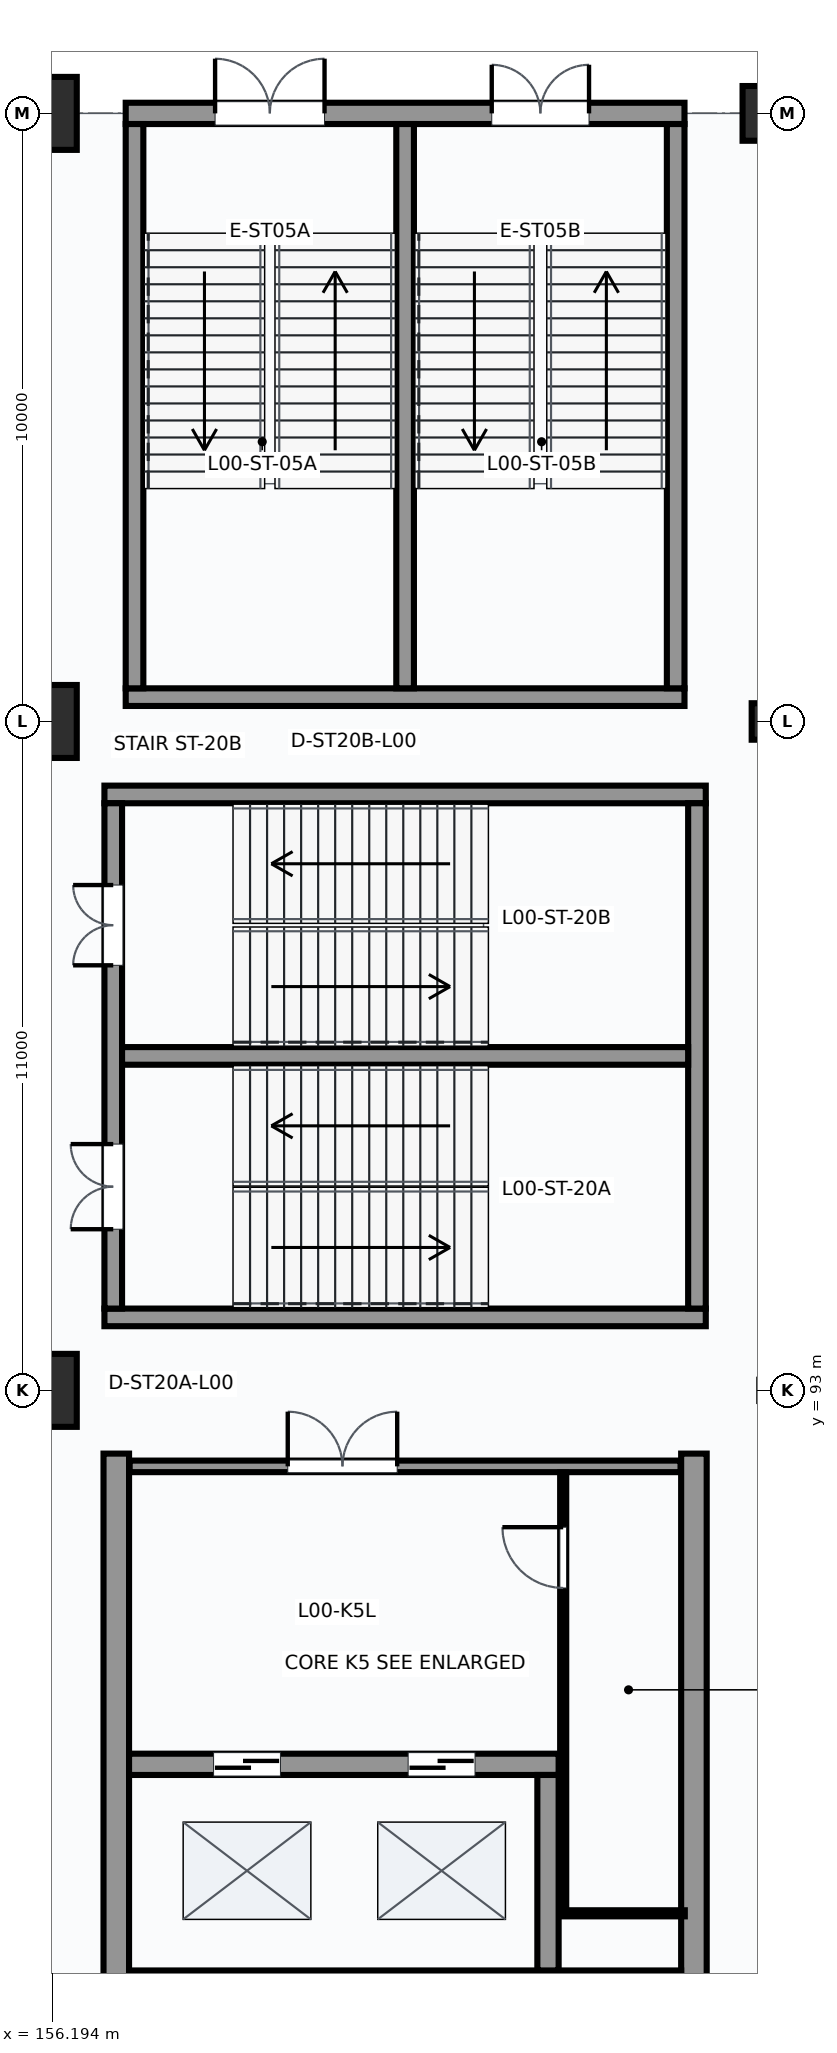
"""IFC4 building model, lengths in metres.
Left out: names, types, materials, properties, quantities, classifications, styles, units other than length and angle.
Written with IfcOpenShell. Run it as: python <this file> out.ifc"""

import sys

from ifc_helpers import new_model, si_unit, direction, frame, frame_2d, origin, origin_2d, place, context, subcontext, project, spatial, rectangle, circle, extrude, element, fill, save


model = new_model("IFC4")
c1 = context("Model", 3, precision=1e-05, world=origin(), true_north=direction((0.0, 1.0)))
c2 = subcontext(c1, "Body", "Model", "MODEL_VIEW")
j1 = project(units=[si_unit("LENGTHUNIT", "METRE"), si_unit("PLANEANGLEUNIT", "RADIAN")], contexts=[c1])
p1 = place(None, origin())
s1 = spatial("IfcSite", under=j1, at=p1, CompositionType="ELEMENT")
p2 = place(p1, origin())
s2 = spatial("IfcBuilding", under=s1, at=p2, CompositionType="ELEMENT")
p3 = place(p2, origin())
s3 = spatial("IfcBuildingStorey", under=s2, at=p3, CompositionType="ELEMENT", Elevation=0.0)
for number, where, z_axis, x_axis in (
    (1, (156.0, 93.0, 0.0), (0.0, 0.0, 1.0), (1.0, 0.0, 0.0)),
    (2, (156.0, 104.0, 0.0), (0.0, 0.0, 1.0), (1.0, 0.0, 0.0)),
    (3, (156.0, 114.0, 0.0), (0.0, 0.0, 1.0), (1.0, 0.0, 0.0)),
):
    element("IfcColumn", number, at=place(p3, frame(where, z_axis=z_axis, x_axis=x_axis)), inside=s3, PredefinedType="COLUMN", context=c2, shape_type="SweptSolid", body=[
        extrude(rectangle(XDim=1.2, YDim=1.2, at=origin_2d()), origin(), (0.0, 0.0, 1.0), 5.4),
    ])
p4 = place(p3, frame((168.0, 104.0, 0.0), z_axis=(0.0, 0.0, 1.0), x_axis=(1.0, 0.0, 0.0)))
e4 = element("IfcColumn", 4, at=p4, inside=s3, PredefinedType="COLUMN", context=c2, shape_type="SweptSolid", body=[
    extrude(rectangle(XDim=0.6, YDim=0.6, at=origin_2d()), origin(), (0.0, 0.0, 1.0), 5.4),
])
p5 = place(p3, frame((168.0, 114.0, 0.0), z_axis=(0.0, 0.0, 1.0), x_axis=(1.0, 0.0, 0.0)))
e5 = element("IfcColumn", 5, at=p5, inside=s3, PredefinedType="COLUMN", context=c2, shape_type="SweptSolid", body=[
    extrude(circle(Radius=0.45, at=origin_2d()), origin(), (0.0, 0.0, 1.0), 5.4),
])
p6 = place(p3, frame((157.405, 104.4, 0.0), z_axis=(0.0, 0.0, 1.0), x_axis=(1.0, 0.0, 0.0)))
e6 = element("IfcWall", 6, at=p6, inside=s3, PredefinedType="SHEAR", context=c2, shape_type="SweptSolid", body=[
    extrude(rectangle(XDim=9.19, YDim=0.29, at=frame_2d((4.595, 0.0))), origin(), (0.0, 0.0, 1.0), 5.4),
])
p7 = place(p3, frame((157.405, 114.0, 0.0), z_axis=(0.0, 0.0, 1.0), x_axis=(1.0, 0.0, 0.0)))
e7 = element("IfcWall", 7, at=p7, inside=s3, PredefinedType="SHEAR", context=c2, shape_type="SweptSolid", body=[
    extrude(rectangle(XDim=9.19, YDim=0.35, at=frame_2d((4.595, 0.0))), origin(), (0.0, 0.0, 1.0), 4.347),
])
p8 = place(p7, frame((1.47, 0.0, 0.0)))
e8 = element("IfcOpeningElement", 8, at=p8, cuts=e7, PredefinedType="OPENING", context=c2, shape_type="SweptSolid", body=[
    extrude(rectangle(XDim=1.8, YDim=2.2, at=frame_2d((0.9, 1.1))), frame((0.0, 0.185, 0.0), z_axis=(0.0, -1.0, 0.0), x_axis=(1.0, 0.0, 0.0)), (0.0, 0.0, 1.0), 0.37),
])
p9 = place(p7, frame((6.02, 0.0, 0.0)))
e9 = element("IfcOpeningElement", 9, at=p9, cuts=e7, PredefinedType="OPENING", context=c2, shape_type="SweptSolid", body=[
    extrude(rectangle(XDim=1.6, YDim=2.2, at=frame_2d((0.8, 1.1))), frame((0.0, 0.185, 0.0), z_axis=(0.0, -1.0, 0.0), x_axis=(1.0, 0.0, 0.0)), (0.0, 0.0, 1.0), 0.37),
])
for number, where, z_axis, x_axis in (
    (10, (157.55, 104.545, 0.0), (0.0, 0.0, 1.0), (0.0, 1.0, 0.0)),
    (11, (166.45, 104.545, 0.0), (0.0, 0.0, 1.0), (0.0, 1.0, 0.0)),
    (12, (162.0, 104.545, 0.0), (0.0, 0.0, 1.0), (0.0, 1.0, 0.0)),
):
    element("IfcWall", number, at=place(p3, frame(where, z_axis=z_axis, x_axis=x_axis)), inside=s3, PredefinedType="SHEAR", context=c2, shape_type="SweptSolid", body=[
        extrude(rectangle(XDim=9.28, YDim=0.29, at=frame_2d((4.64, 0.0))), origin(), (0.0, 0.0, 1.0), 5.4),
    ])
for number, where, z_axis, x_axis in (
    (13, (157.055, 94.2, 0.0), (0.0, 0.0, 1.0), (1.0, 0.0, 0.0)),
    (14, (157.055, 102.8, 0.0), (0.0, 0.0, 1.0), (1.0, 0.0, 0.0)),
):
    element("IfcWall", number, at=place(p3, frame(where, z_axis=z_axis, x_axis=x_axis)), inside=s3, PredefinedType="SHEAR", context=c2, shape_type="SweptSolid", body=[
        extrude(rectangle(XDim=9.89, YDim=0.29, at=frame_2d((4.945, 0.0))), origin(), (0.0, 0.0, 1.0), 5.4),
    ])
p10 = place(p3, frame((157.2, 94.345, 0.0), z_axis=(0.0, 0.0, 1.0), x_axis=(0.0, 1.0, 0.0)))
e15 = element("IfcWall", 15, at=p10, inside=s3, PredefinedType="SHEAR", context=c2, shape_type="SweptSolid", body=[
    extrude(rectangle(XDim=8.31, YDim=0.29, at=frame_2d((4.155, 0.0))), origin(), (0.0, 0.0, 1.0), 5.4),
])
p11 = place(p10, frame((1.305, 0.0, 0.0)))
e16 = element("IfcOpeningElement", 16, at=p11, cuts=e15, PredefinedType="OPENING", context=c2, shape_type="SweptSolid", body=[
    extrude(rectangle(XDim=1.4, YDim=2.2, at=frame_2d((0.7, 1.1))), frame((0.0, 0.155, 0.0), z_axis=(0.0, -1.0, 0.0), x_axis=(1.0, 0.0, 0.0)), (0.0, 0.0, 1.0), 0.31),
])
p12 = place(p10, frame((5.645, 0.0, 0.0)))
e17 = element("IfcOpeningElement", 17, at=p12, cuts=e15, PredefinedType="OPENING", context=c2, shape_type="SweptSolid", body=[
    extrude(rectangle(XDim=1.32, YDim=2.2, at=frame_2d((0.66, 1.1))), frame((0.0, 0.155, 0.0), z_axis=(0.0, -1.0, 0.0), x_axis=(1.0, 0.0, 0.0)), (0.0, 0.0, 1.0), 0.31),
])
p13 = place(p3, frame((166.8, 94.345, 0.0), z_axis=(0.0, 0.0, 1.0), x_axis=(0.0, 1.0, 0.0)))
e18 = element("IfcWall", 18, at=p13, inside=s3, PredefinedType="SHEAR", context=c2, shape_type="SweptSolid", body=[
    extrude(rectangle(XDim=8.31, YDim=0.29, at=frame_2d((4.155, 0.0))), origin(), (0.0, 0.0, 1.0), 5.4),
])
p14 = place(p3, frame((157.345, 98.5, 0.0), z_axis=(0.0, 0.0, 1.0), x_axis=(1.0, 0.0, 0.0)))
e19 = element("IfcWall", 19, at=p14, inside=s3, PredefinedType="SHEAR", context=c2, shape_type="SweptSolid", body=[
    extrude(rectangle(XDim=9.31, YDim=0.29, at=frame_2d((4.655, 0.0))), origin(), (0.0, 0.0, 1.0), 5.4),
])
for number, where, z_axis, x_axis in (
    (20, (157.25, 83.04, 0.0), (0.0, 0.0, 1.0), (0.0, 1.0, 0.0)),
    (21, (166.75, 83.04, 0.0), (0.0, 0.0, 1.0), (0.0, 1.0, 0.0)),
):
    element("IfcWall", number, at=place(p3, frame(where, z_axis=z_axis, x_axis=x_axis)), inside=s3, PredefinedType="SHEAR", context=c2, shape_type="SweptSolid", body=[
        extrude(rectangle(XDim=8.92, YDim=0.42, at=frame_2d((4.46, 0.0))), origin(), (0.0, 0.0, 1.0), 5.4),
    ])
p15 = place(p3, frame((157.46, 83.25, 0.0), z_axis=(0.0, 0.0, 1.0), x_axis=(1.0, 0.0, 0.0)))
e22 = element("IfcWall", 22, at=p15, inside=s3, PredefinedType="SHEAR", context=c2, shape_type="SweptSolid", body=[
    extrude(rectangle(XDim=9.08, YDim=0.42, at=frame_2d((4.54, 0.0))), origin(), (0.0, 0.0, 1.0), 5.4),
])
p16 = place(p3, frame((157.46, 86.85, 0.0), z_axis=(0.0, 0.0, 1.0), x_axis=(1.0, 0.0, 0.0)))
e23 = element("IfcWall", 23, at=p16, inside=s3, PredefinedType="SHEAR", context=c2, shape_type="SweptSolid", body=[
    extrude(rectangle(XDim=7.065, YDim=0.35, at=frame_2d((3.532, 0.0))), origin(), (0.0, 0.0, 1.0), 5.4),
])
p17 = place(p16, frame((1.39, 0.0, 0.0)))
e24 = element("IfcOpeningElement", 24, at=p17, cuts=e23, PredefinedType="OPENING", context=c2, shape_type="SweptSolid", body=[
    extrude(rectangle(XDim=1.1, YDim=2.2, at=frame_2d((0.55, 1.1))), frame((0.0, 0.185, 0.0), z_axis=(0.0, -1.0, 0.0), x_axis=(1.0, 0.0, 0.0)), (0.0, 0.0, 1.0), 0.37),
])
p18 = place(p16, frame((4.59, 0.0, 0.0)))
e25 = element("IfcOpeningElement", 25, at=p18, cuts=e23, PredefinedType="OPENING", context=c2, shape_type="SweptSolid", body=[
    extrude(rectangle(XDim=1.1, YDim=2.2, at=frame_2d((0.55, 1.1))), frame((0.0, 0.185, 0.0), z_axis=(0.0, -1.0, 0.0), x_axis=(1.0, 0.0, 0.0)), (0.0, 0.0, 1.0), 0.37),
])
p19 = place(p3, frame((164.35, 83.46, 0.0), z_axis=(0.0, 0.0, 1.0), x_axis=(0.0, 1.0, 0.0)))
e26 = element("IfcWall", 26, at=p19, inside=s3, PredefinedType="SHEAR", context=c2, shape_type="SweptSolid", body=[
    extrude(rectangle(XDim=3.215, YDim=0.35, at=frame_2d((1.607, 0.0))), origin(), (0.0, 0.0, 1.0), 5.4),
])
p20 = place(p3, frame((157.47, 91.75, 0.0), z_axis=(0.0, 0.0, 1.0), x_axis=(1.0, 0.0, 0.0)))
e27 = element("IfcWall", 27, at=p20, inside=s3, PredefinedType="PARTITIONING", context=c2, shape_type="SweptSolid", body=[
    extrude(rectangle(XDim=9.06, YDim=0.19, at=frame_2d((4.53, 0.0))), origin(), (0.0, 0.0, 1.0), 5.06),
])
p21 = place(p20, frame((2.6, 0.0, 0.0)))
e28 = element("IfcOpeningElement", 28, at=p21, cuts=e27, PredefinedType="OPENING", context=c2, shape_type="SweptSolid", body=[
    extrude(rectangle(XDim=1.8, YDim=2.3, at=frame_2d((0.9, 1.15))), frame((0.0, 0.105, 0.0), z_axis=(0.0, -1.0, 0.0), x_axis=(1.0, 0.0, 0.0)), (0.0, 0.0, 1.0), 0.21),
])
p22 = place(p3, frame((164.6, 84.4, 0.0), z_axis=(0.0, 0.0, 1.0), x_axis=(0.0, 1.0, 0.0)))
e29 = element("IfcWall", 29, at=p22, inside=s3, PredefinedType="PARTITIONING", context=c2, shape_type="SweptSolid", body=[
    extrude(rectangle(XDim=7.25, YDim=0.1, at=frame_2d((3.625, 0.0))), origin(), (0.0, 0.0, 1.0), 5.06),
])
p23 = place(p22, frame((5.35, 0.0, 0.0)))
e30 = element("IfcOpeningElement", 30, at=p23, cuts=e29, PredefinedType="OPENING", context=c2, shape_type="SweptSolid", body=[
    extrude(rectangle(XDim=1.0, YDim=2.1, at=frame_2d((0.5, 1.05))), frame((0.0, 0.06, 0.0), z_axis=(0.0, -1.0, 0.0), x_axis=(1.0, 0.0, 0.0)), (0.0, 0.0, 1.0), 0.12),
])
p24 = place(p3, frame((164.6, 84.4, 0.0), z_axis=(0.0, 0.0, 1.0), x_axis=(1.0, 0.0, 0.0)))
e31 = element("IfcWall", 31, at=p24, inside=s3, PredefinedType="PARTITIONING", context=c2, shape_type="SweptSolid", body=[
    extrude(rectangle(XDim=2.0, YDim=0.1, at=frame_2d((1.0, 0.0))), origin(), (0.0, 0.0, 1.0), 5.06),
])
p25 = place(p8, origin())
e32 = element("IfcDoor", 32, at=p25, inside=s3, OperationType="DOUBLE_DOOR_SINGLE_SWING", PredefinedType="DOOR", context=c2, shape_type="SweptSolid", body=[
    extrude(rectangle(XDim=1.8, YDim=2.2, at=frame_2d((0.9, 1.1))), frame((0.0, 0.025, 0.0), z_axis=(0.0, -1.0, 0.0), x_axis=(1.0, 0.0, 0.0)), (0.0, 0.0, 1.0), 0.05),
])
fill(e8, e32)
p26 = place(p9, origin())
e33 = element("IfcDoor", 33, at=p26, inside=s3, OperationType="DOUBLE_DOOR_SINGLE_SWING", PredefinedType="DOOR", context=c2, shape_type="SweptSolid", body=[
    extrude(rectangle(XDim=1.6, YDim=2.2, at=frame_2d((0.8, 1.1))), frame((0.0, 0.025, 0.0), z_axis=(0.0, -1.0, 0.0), x_axis=(1.0, 0.0, 0.0)), (0.0, 0.0, 1.0), 0.05),
])
fill(e9, e33)
p27 = place(p11, origin())
e34 = element("IfcDoor", 34, at=p27, inside=s3, OperationType="DOUBLE_DOOR_SINGLE_SWING", PredefinedType="DOOR", context=c2, shape_type="SweptSolid", body=[
    extrude(rectangle(XDim=1.4, YDim=2.2, at=frame_2d((0.7, 1.1))), frame((0.0, 0.025, 0.0), z_axis=(0.0, -1.0, 0.0), x_axis=(1.0, 0.0, 0.0)), (0.0, 0.0, 1.0), 0.05),
])
fill(e16, e34)
p28 = place(p12, origin())
e35 = element("IfcDoor", 35, at=p28, inside=s3, OperationType="DOUBLE_DOOR_SINGLE_SWING", PredefinedType="DOOR", context=c2, shape_type="SweptSolid", body=[
    extrude(rectangle(XDim=1.32, YDim=2.2, at=frame_2d((0.66, 1.1))), frame((0.0, 0.025, 0.0), z_axis=(0.0, -1.0, 0.0), x_axis=(1.0, 0.0, 0.0)), (0.0, 0.0, 1.0), 0.05),
])
fill(e17, e35)
p29 = place(p17, origin())
e36 = element("IfcDoor", 36, at=p29, inside=s3, OperationType="SLIDING_TO_LEFT", PredefinedType="DOOR", context=c2, shape_type="SweptSolid", body=[
    extrude(rectangle(XDim=1.1, YDim=2.2, at=frame_2d((0.55, 1.1))), frame((0.0, 0.025, 0.0), z_axis=(0.0, -1.0, 0.0), x_axis=(1.0, 0.0, 0.0)), (0.0, 0.0, 1.0), 0.05),
])
fill(e24, e36)
p30 = place(p18, origin())
e37 = element("IfcDoor", 37, at=p30, inside=s3, OperationType="SLIDING_TO_LEFT", PredefinedType="DOOR", context=c2, shape_type="SweptSolid", body=[
    extrude(rectangle(XDim=1.1, YDim=2.2, at=frame_2d((0.55, 1.1))), frame((0.0, 0.025, 0.0), z_axis=(0.0, -1.0, 0.0), x_axis=(1.0, 0.0, 0.0)), (0.0, 0.0, 1.0), 0.05),
])
fill(e25, e37)
p31 = place(p21, origin())
e38 = element("IfcDoor", 38, at=p31, inside=s3, OperationType="DOUBLE_DOOR_SINGLE_SWING", PredefinedType="DOOR", context=c2, shape_type="SweptSolid", body=[
    extrude(rectangle(XDim=1.8, YDim=2.3, at=frame_2d((0.9, 1.15))), frame((0.0, 0.025, 0.0), z_axis=(0.0, -1.0, 0.0), x_axis=(1.0, 0.0, 0.0)), (0.0, 0.0, 1.0), 0.05),
])
fill(e28, e38)
p32 = place(p23, origin())
e39 = element("IfcDoor", 39, at=p32, inside=s3, OperationType="SINGLE_SWING_RIGHT", PredefinedType="DOOR", context=c2, shape_type="SweptSolid", body=[
    extrude(rectangle(XDim=1.0, YDim=2.1, at=frame_2d((0.5, 1.05))), frame((0.0, 0.025, 0.0), z_axis=(0.0, -1.0, 0.0), x_axis=(1.0, 0.0, 0.0)), (0.0, 0.0, 1.0), 0.05),
])
fill(e30, e39)
save(model, sys.argv[1])
